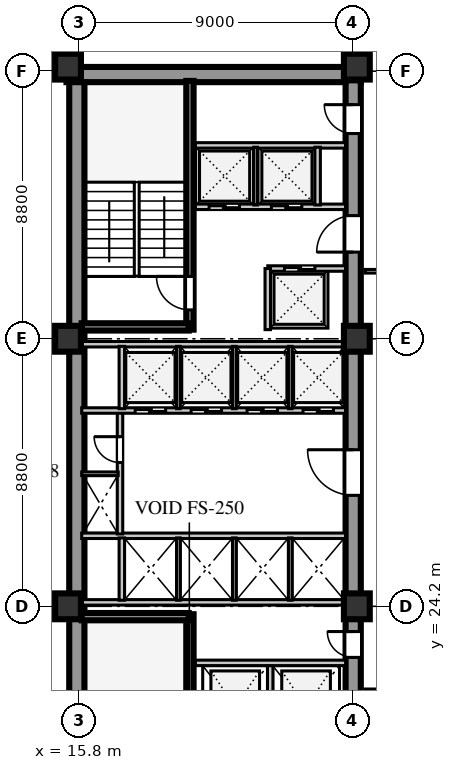
"""IFC4 building model, lengths in metres.
Left out: names, types, materials, properties, quantities, classifications, styles, units other than length and angle.
Written with IfcOpenShell. Run it as: python <this file> out.ifc"""

import sys

from ifc_helpers import new_model, si_unit, direction, frame, frame_2d, origin, origin_2d, place, context, subcontext, project, spatial, rectangle, extrude, element, fill, save


model = new_model("IFC4")
c1 = context("Model", 3, precision=1e-05, world=origin(), true_north=direction((0.0, 1.0)))
c2 = subcontext(c1, "Body", "Model", "MODEL_VIEW")
j1 = project(units=[si_unit("LENGTHUNIT", "METRE"), si_unit("PLANEANGLEUNIT", "RADIAN")], contexts=[c1])
p1 = place(None, origin())
s1 = spatial("IfcSite", under=j1, at=p1, CompositionType="ELEMENT")
p2 = place(p1, origin())
s2 = spatial("IfcBuilding", under=s1, at=p2, CompositionType="ELEMENT")
p3 = place(p2, frame((0.0, 0.0, 104.0)))
s3 = spatial("IfcBuildingStorey", under=s2, at=p3, CompositionType="ELEMENT", Elevation=104.0)
p4 = place(p3, frame((15.4, 41.69, 0.0), z_axis=(0.0, 0.0, 1.0), x_axis=(1.0, 0.0, 0.0)))
e1 = element("IfcWall", 1, at=p4, inside=s3, PredefinedType="SHEAR", context=c2, shape_type="SweptSolid", body=[
    extrude(rectangle(XDim=9.68, YDim=0.5, at=frame_2d((4.84, 0.0))), origin(), (0.0, 0.0, 1.0), 3.6),
])
p5 = place(p3, frame((15.74, 15.81, 0.0), z_axis=(0.0, 0.0, 1.0), x_axis=(0.0, 1.0, 0.0)))
e2 = element("IfcWall", 2, at=p5, inside=s3, PredefinedType="SHEAR", context=c2, shape_type="SweptSolid", body=[
    extrude(rectangle(XDim=25.63, YDim=0.5, at=frame_2d((12.815, 0.0))), origin(), (0.0, 0.0, 1.0), 3.6),
])
p6 = place(p3, frame((24.83, 15.74, 0.0), z_axis=(0.0, 0.0, 1.0), x_axis=(0.0, 1.0, 0.0)))
e3 = element("IfcWall", 3, at=p6, inside=s3, PredefinedType="SHEAR", context=c2, shape_type="SweptSolid", body=[
    extrude(rectangle(XDim=25.76, YDim=0.5, at=frame_2d((12.88, 0.0))), origin(), (0.0, 0.0, 1.0), 3.6),
])
p7 = place(p6, frame((1.61, 0.0, 0.0)))
e4 = element("IfcOpeningElement", 4, at=p7, cuts=e3, PredefinedType="OPENING", context=c2, shape_type="SweptSolid", body=[
    extrude(rectangle(XDim=1.2, YDim=2.1, at=frame_2d((0.6, 1.05))), frame((0.0, 0.26, 0.0), z_axis=(0.0, -1.0, 0.0), x_axis=(1.0, 0.0, 0.0)), (0.0, 0.0, 1.0), 0.52),
])
p8 = place(p6, frame((6.78, 0.0, 0.0)))
e5 = element("IfcOpeningElement", 5, at=p8, cuts=e3, PredefinedType="OPENING", context=c2, shape_type="SweptSolid", body=[
    extrude(rectangle(XDim=0.85, YDim=2.06, at=frame_2d((0.425, 1.03))), frame((0.0, 0.26, 0.0), z_axis=(0.0, -1.0, 0.0), x_axis=(1.0, 0.0, 0.0)), (0.0, 0.0, 1.0), 0.52),
])
p9 = place(p6, frame((12.11, 0.0, 0.0)))
e6 = element("IfcOpeningElement", 6, at=p9, cuts=e3, PredefinedType="OPENING", context=c2, shape_type="SweptSolid", body=[
    extrude(rectangle(XDim=1.5, YDim=2.12, at=frame_2d((0.75, 1.06))), frame((0.0, 0.26, 0.0), z_axis=(0.0, -1.0, 0.0), x_axis=(1.0, 0.0, 0.0)), (0.0, 0.0, 1.0), 0.52),
])
p10 = place(p6, frame((20.11, 0.0, 0.0)))
e7 = element("IfcOpeningElement", 7, at=p10, cuts=e3, PredefinedType="OPENING", context=c2, shape_type="SweptSolid", body=[
    extrude(rectangle(XDim=1.2, YDim=2.12, at=frame_2d((0.6, 1.06))), frame((0.0, 0.26, 0.0), z_axis=(0.0, -1.0, 0.0), x_axis=(1.0, 0.0, 0.0)), (0.0, 0.0, 1.0), 0.52),
])
p11 = place(p6, frame((24.01, 0.0, 0.0)))
e8 = element("IfcOpeningElement", 8, at=p11, cuts=e3, PredefinedType="OPENING", context=c2, shape_type="SweptSolid", body=[
    extrude(rectangle(XDim=0.95, YDim=2.1, at=frame_2d((0.475, 1.05))), frame((0.0, 0.26, 0.0), z_axis=(0.0, -1.0, 0.0), x_axis=(1.0, 0.0, 0.0)), (0.0, 0.0, 1.0), 0.52),
])
for number, where, z_axis, x_axis in (
    (9, (15.45, 24.2, 0.0), (0.0, 0.0, 1.0), (1.0, 0.0, 0.0)),
    (10, (15.45, 33.0, 0.0), (0.0, 0.0, 1.0), (1.0, 0.0, 0.0)),
    (11, (15.45, 41.95, 0.0), (0.0, 0.0, 1.0), (1.0, 0.0, 0.0)),
    (12, (24.95, 24.2, 0.0), (0.0, 0.0, 1.0), (1.0, 0.0, 0.0)),
    (13, (24.95, 33.0, 0.0), (0.0, 0.0, 1.0), (1.0, 0.0, 0.0)),
    (14, (24.95, 41.95, 0.0), (0.0, 0.0, 1.0), (1.0, 0.0, 0.0)),
):
    element("IfcColumn", number, at=place(p3, frame(where, z_axis=z_axis, x_axis=x_axis)), inside=s3, PredefinedType="COLUMN", context=c2, shape_type="SweptSolid", body=[
        extrude(rectangle(XDim=0.85, YDim=0.85, at=origin_2d()), origin(), (0.0, 0.0, 1.0), 3.6),
    ])
p12 = place(p3, frame((19.46, 15.74, 0.0), z_axis=(0.0, 0.0, 1.0), x_axis=(0.0, 1.0, 0.0)))
e15 = element("IfcWall", 15, at=p12, inside=s3, PredefinedType="SHEAR", context=c2, shape_type="SweptSolid", body=[
    extrude(rectangle(XDim=8.2, YDim=0.24, at=frame_2d((4.1, 0.0))), origin(), (0.0, 0.0, 1.0), 3.85),
])
p13 = place(p12, frame((0.45, 0.0, 0.0)))
e16 = element("IfcOpeningElement", 16, at=p13, cuts=e15, PredefinedType="OPENING", context=c2, shape_type="SweptSolid", body=[
    extrude(rectangle(XDim=1.1, YDim=2.1, at=frame_2d((0.55, 1.05))), frame((0.0, 0.13, 0.0), z_axis=(0.0, -1.0, 0.0), x_axis=(1.0, 0.0, 0.0)), (0.0, 0.0, 1.0), 0.26),
])
p14 = place(p3, frame((15.9, 23.86, 0.0), z_axis=(0.0, 0.0, 1.0), x_axis=(1.0, 0.0, 0.0)))
e17 = element("IfcWall", 17, at=p14, inside=s3, PredefinedType="SHEAR", context=c2, shape_type="SweptSolid", body=[
    extrude(rectangle(XDim=3.52, YDim=0.24, at=frame_2d((1.76, 0.0))), origin(), (0.0, 0.0, 1.0), 3.85),
])
p15 = place(p3, frame((22.1, 19.51, 0.0), z_axis=(0.0, 0.0, 1.0), x_axis=(0.0, 1.0, 0.0)))
e18 = element("IfcWall", 18, at=p15, inside=s3, PredefinedType="SOLIDWALL", context=c2, shape_type="SweptSolid", body=[
    extrude(rectangle(XDim=2.74, YDim=0.18, at=frame_2d((1.37, 0.0))), origin(), (0.0, 0.0, 1.0), 3.6),
])
p16 = place(p3, frame((19.64, 22.34, 0.0), z_axis=(0.0, 0.0, 1.0), x_axis=(1.0, 0.0, 0.0)))
e19 = element("IfcWall", 19, at=p16, inside=s3, PredefinedType="SOLIDWALL", context=c2, shape_type="SweptSolid", body=[
    extrude(rectangle(XDim=4.94, YDim=0.18, at=frame_2d((2.47, 0.0))), origin(), (0.0, 0.0, 1.0), 3.6),
])
p17 = place(p3, frame((15.9, 26.52, 0.0), z_axis=(0.0, 0.0, 1.0), x_axis=(1.0, 0.0, 0.0)))
e20 = element("IfcWall", 20, at=p17, inside=s3, PredefinedType="SOLIDWALL", context=c2, shape_type="SweptSolid", body=[
    extrude(rectangle(XDim=8.68, YDim=0.18, at=frame_2d((4.34, 0.0))), origin(), (0.0, 0.0, 1.0), 3.6),
])
p18 = place(p3, frame((15.9, 24.33, 0.0), z_axis=(0.0, 0.0, 1.0), x_axis=(1.0, 0.0, 0.0)))
e21 = element("IfcWall", 21, at=p18, inside=s3, PredefinedType="SOLIDWALL", context=c2, shape_type="SweptSolid", body=[
    extrude(rectangle(XDim=8.68, YDim=0.18, at=frame_2d((4.34, 0.0))), origin(), (0.0, 0.0, 1.0), 2.95),
])
p19 = place(p3, frame((17.22, 24.4, 0.0), z_axis=(0.0, 0.0, 1.0), x_axis=(0.0, 1.0, 0.0)))
e22 = element("IfcWall", 22, at=p19, inside=s3, PredefinedType="SOLIDWALL", context=c2, shape_type="SweptSolid", body=[
    extrude(rectangle(XDim=2.05, YDim=0.18, at=frame_2d((1.025, 0.0))), origin(), (0.0, 0.0, 1.0), 3.6),
])
for number, where, z_axis, x_axis in (
    (23, (19.08, 24.4, 0.0), (0.0, 0.0, 1.0), (0.0, 1.0, 0.0)),
    (24, (20.92, 24.4, 0.0), (0.0, 0.0, 1.0), (0.0, 1.0, 0.0)),
    (25, (22.76, 24.4, 0.0), (0.0, 0.0, 1.0), (0.0, 1.0, 0.0)),
):
    element("IfcWall", number, at=place(p3, frame(where, z_axis=z_axis, x_axis=x_axis)), inside=s3, PredefinedType="PARTITIONING", context=c2, shape_type="SweptSolid", body=[
        extrude(rectangle(XDim=2.05, YDim=0.12, at=frame_2d((1.025, 0.0))), origin(), (0.0, 0.0, 1.0), 3.6),
    ])
p20 = place(p3, frame((17.16, 26.58, 0.0), z_axis=(0.0, 0.0, 1.0), x_axis=(0.0, 1.0, 0.0)))
e26 = element("IfcWall", 26, at=p20, inside=s3, PredefinedType="SOLIDWALL", context=c2, shape_type="SweptSolid", body=[
    extrude(rectangle(XDim=4.02, YDim=0.18, at=frame_2d((2.01, 0.0))), origin(), (0.0, 0.0, 1.0), 3.6),
])
p21 = place(p20, frame((2.35, 0.0, 0.0)))
e27 = element("IfcOpeningElement", 27, at=p21, cuts=e26, PredefinedType="OPENING", context=c2, shape_type="SweptSolid", body=[
    extrude(rectangle(XDim=0.85, YDim=2.06, at=frame_2d((0.425, 1.03))), frame((0.0, 0.1, 0.0), z_axis=(0.0, -1.0, 0.0), x_axis=(1.0, 0.0, 0.0)), (0.0, 0.0, 1.0), 0.2),
])
p22 = place(p3, frame((15.9, 28.56, 0.0), z_axis=(0.0, 0.0, 1.0), x_axis=(1.0, 0.0, 0.0)))
e28 = element("IfcWall", 28, at=p22, inside=s3, PredefinedType="PARTITIONING", context=c2, shape_type="SweptSolid", body=[
    extrude(rectangle(XDim=1.2, YDim=0.12, at=frame_2d((0.6, 0.0))), origin(), (0.0, 0.0, 1.0), 3.6),
])
p23 = place(p3, frame((15.9, 30.64, 0.0), z_axis=(0.0, 0.0, 1.0), x_axis=(1.0, 0.0, 0.0)))
e29 = element("IfcWall", 29, at=p23, inside=s3, PredefinedType="SOLIDWALL", context=c2, shape_type="SweptSolid", body=[
    extrude(rectangle(XDim=8.68, YDim=0.18, at=frame_2d((4.34, 0.0))), origin(), (0.0, 0.0, 1.0), 3.6),
])
p24 = place(p23, frame((1.76, 0.0, 0.0)))
e30 = element("IfcOpeningElement", 30, at=p24, cuts=e29, PredefinedType="OPENING", context=c2, shape_type="SweptSolid", body=[
    extrude(rectangle(XDim=1.0, YDim=2.1, at=frame_2d((0.5, 1.05))), frame((0.0, 0.1, 0.0), z_axis=(0.0, -1.0, 0.0), x_axis=(1.0, 0.0, 0.0)), (0.0, 0.0, 1.0), 0.2),
])
p25 = place(p23, frame((3.6, 0.0, 0.0)))
e31 = element("IfcOpeningElement", 31, at=p25, cuts=e29, PredefinedType="OPENING", context=c2, shape_type="SweptSolid", body=[
    extrude(rectangle(XDim=1.0, YDim=2.1, at=frame_2d((0.5, 1.05))), frame((0.0, 0.1, 0.0), z_axis=(0.0, -1.0, 0.0), x_axis=(1.0, 0.0, 0.0)), (0.0, 0.0, 1.0), 0.2),
])
p26 = place(p23, frame((5.44, 0.0, 0.0)))
e32 = element("IfcOpeningElement", 32, at=p26, cuts=e29, PredefinedType="OPENING", context=c2, shape_type="SweptSolid", body=[
    extrude(rectangle(XDim=1.0, YDim=2.1, at=frame_2d((0.5, 1.05))), frame((0.0, 0.1, 0.0), z_axis=(0.0, -1.0, 0.0), x_axis=(1.0, 0.0, 0.0)), (0.0, 0.0, 1.0), 0.2),
])
p27 = place(p23, frame((7.28, 0.0, 0.0)))
e33 = element("IfcOpeningElement", 33, at=p27, cuts=e29, PredefinedType="OPENING", context=c2, shape_type="SweptSolid", body=[
    extrude(rectangle(XDim=1.0, YDim=2.1, at=frame_2d((0.5, 1.05))), frame((0.0, 0.1, 0.0), z_axis=(0.0, -1.0, 0.0), x_axis=(1.0, 0.0, 0.0)), (0.0, 0.0, 1.0), 0.2),
])
p28 = place(p3, frame((15.9, 32.82, 0.0), z_axis=(0.0, 0.0, 1.0), x_axis=(1.0, 0.0, 0.0)))
e34 = element("IfcWall", 34, at=p28, inside=s3, PredefinedType="SOLIDWALL", context=c2, shape_type="SweptSolid", body=[
    extrude(rectangle(XDim=8.68, YDim=0.18, at=frame_2d((4.34, 0.0))), origin(), (0.0, 0.0, 1.0), 2.95),
])
p29 = place(p3, frame((17.22, 30.7, 0.0), z_axis=(0.0, 0.0, 1.0), x_axis=(0.0, 1.0, 0.0)))
e35 = element("IfcWall", 35, at=p29, inside=s3, PredefinedType="SOLIDWALL", context=c2, shape_type="SweptSolid", body=[
    extrude(rectangle(XDim=2.05, YDim=0.18, at=frame_2d((1.025, 0.0))), origin(), (0.0, 0.0, 1.0), 3.6),
])
for number, where, z_axis, x_axis in (
    (36, (19.08, 30.7, 0.0), (0.0, 0.0, 1.0), (0.0, 1.0, 0.0)),
    (37, (20.92, 30.7, 0.0), (0.0, 0.0, 1.0), (0.0, 1.0, 0.0)),
    (38, (22.76, 30.7, 0.0), (0.0, 0.0, 1.0), (0.0, 1.0, 0.0)),
):
    element("IfcWall", number, at=place(p3, frame(where, z_axis=z_axis, x_axis=x_axis)), inside=s3, PredefinedType="PARTITIONING", context=c2, shape_type="SweptSolid", body=[
        extrude(rectangle(XDim=2.05, YDim=0.12, at=frame_2d((1.025, 0.0))), origin(), (0.0, 0.0, 1.0), 3.6),
    ])
p30 = place(p3, frame((19.46, 33.3, 0.0), z_axis=(0.0, 0.0, 1.0), x_axis=(0.0, 1.0, 0.0)))
e39 = element("IfcWall", 39, at=p30, inside=s3, PredefinedType="SHEAR", context=c2, shape_type="SweptSolid", body=[
    extrude(rectangle(XDim=8.18, YDim=0.24, at=frame_2d((4.09, 0.0))), origin(), (0.0, 0.0, 1.0), 3.85),
])
p31 = place(p30, frame((0.65, 0.0, 0.0)))
e40 = element("IfcOpeningElement", 40, at=p31, cuts=e39, PredefinedType="OPENING", context=c2, shape_type="SweptSolid", body=[
    extrude(rectangle(XDim=1.1, YDim=2.1, at=frame_2d((0.55, 1.05))), frame((0.0, 0.13, 0.0), z_axis=(0.0, -1.0, 0.0), x_axis=(1.0, 0.0, 0.0)), (0.0, 0.0, 1.0), 0.26),
])
p32 = place(p3, frame((15.9, 33.39, 0.0), z_axis=(0.0, 0.0, 1.0), x_axis=(1.0, 0.0, 0.0)))
e41 = element("IfcWall", 41, at=p32, inside=s3, PredefinedType="SHEAR", context=c2, shape_type="SweptSolid", body=[
    extrude(rectangle(XDim=3.52, YDim=0.24, at=frame_2d((1.76, 0.0))), origin(), (0.0, 0.0, 1.0), 3.85),
])
p33 = place(p3, frame((22.02, 35.31, 0.0), z_axis=(0.0, 0.0, 1.0), x_axis=(1.0, 0.0, 0.0)))
e42 = element("IfcWall", 42, at=p33, inside=s3, PredefinedType="SOLIDWALL", context=c2, shape_type="SweptSolid", body=[
    extrude(rectangle(XDim=2.56, YDim=0.18, at=frame_2d((1.28, 0.0))), origin(), (0.0, 0.0, 1.0), 3.6),
])
p34 = place(p33, frame((0.55, 0.0, 0.0)))
e43 = element("IfcOpeningElement", 43, at=p34, cuts=e42, PredefinedType="OPENING", context=c2, shape_type="SweptSolid", body=[
    extrude(rectangle(XDim=1.0, YDim=2.1, at=frame_2d((0.5, 1.05))), frame((0.0, 0.1, 0.0), z_axis=(0.0, -1.0, 0.0), x_axis=(1.0, 0.0, 0.0)), (0.0, 0.0, 1.0), 0.2),
])
p35 = place(p3, frame((22.02, 33.3, 0.0), z_axis=(0.0, 0.0, 1.0), x_axis=(0.0, 1.0, 0.0)))
e44 = element("IfcWall", 44, at=p35, inside=s3, PredefinedType="SOLIDWALL", context=c2, shape_type="SweptSolid", body=[
    extrude(rectangle(XDim=2.01, YDim=0.18, at=frame_2d((1.005, 0.0))), origin(), (0.0, 0.0, 1.0), 3.6),
])
p36 = place(p3, frame((19.64, 37.34, 0.0), z_axis=(0.0, 0.0, 1.0), x_axis=(1.0, 0.0, 0.0)))
e45 = element("IfcWall", 45, at=p36, inside=s3, PredefinedType="SOLIDWALL", context=c2, shape_type="SweptSolid", body=[
    extrude(rectangle(XDim=4.94, YDim=0.18, at=frame_2d((2.47, 0.0))), origin(), (0.0, 0.0, 1.0), 3.6),
])
p37 = place(p36, frame((0.45, 0.0, 0.0)))
e46 = element("IfcOpeningElement", 46, at=p37, cuts=e45, PredefinedType="OPENING", context=c2, shape_type="SweptSolid", body=[
    extrude(rectangle(XDim=1.0, YDim=2.1, at=frame_2d((0.5, 1.05))), frame((0.0, 0.1, 0.0), z_axis=(0.0, -1.0, 0.0), x_axis=(1.0, 0.0, 0.0)), (0.0, 0.0, 1.0), 0.2),
])
p38 = place(p36, frame((2.5, 0.0, 0.0)))
e47 = element("IfcOpeningElement", 47, at=p38, cuts=e45, PredefinedType="OPENING", context=c2, shape_type="SweptSolid", body=[
    extrude(rectangle(XDim=1.0, YDim=2.1, at=frame_2d((0.5, 1.05))), frame((0.0, 0.1, 0.0), z_axis=(0.0, -1.0, 0.0), x_axis=(1.0, 0.0, 0.0)), (0.0, 0.0, 1.0), 0.2),
])
p39 = place(p3, frame((19.64, 39.36, 0.0), z_axis=(0.0, 0.0, 1.0), x_axis=(1.0, 0.0, 0.0)))
e48 = element("IfcWall", 48, at=p39, inside=s3, PredefinedType="SOLIDWALL", context=c2, shape_type="SweptSolid", body=[
    extrude(rectangle(XDim=4.94, YDim=0.18, at=frame_2d((2.47, 0.0))), origin(), (0.0, 0.0, 1.0), 3.6),
])
p40 = place(p3, frame((21.62, 37.4, 0.0), z_axis=(0.0, 0.0, 1.0), x_axis=(0.0, 1.0, 0.0)))
e49 = element("IfcWall", 49, at=p40, inside=s3, PredefinedType="PARTITIONING", context=c2, shape_type="SweptSolid", body=[
    extrude(rectangle(XDim=1.9, YDim=0.12, at=frame_2d((0.95, 0.0))), origin(), (0.0, 0.0, 1.0), 3.6),
])
p41 = place(p3, frame((23.66, 37.4, 0.0), z_axis=(0.0, 0.0, 1.0), x_axis=(0.0, 1.0, 0.0)))
e50 = element("IfcWall", 50, at=p41, inside=s3, PredefinedType="SOLIDWALL", context=c2, shape_type="SweptSolid", body=[
    extrude(rectangle(XDim=1.9, YDim=0.18, at=frame_2d((0.95, 0.0))), origin(), (0.0, 0.0, 1.0), 3.6),
])
p42 = place(p3, frame((25.22, 21.42, 0.0), z_axis=(0.0, 0.0, 1.0), x_axis=(1.0, 0.0, 0.0)))
e51 = element("IfcWall", 51, at=p42, inside=s3, PredefinedType="PARTITIONING", context=c2, shape_type="SweptSolid", body=[
    extrude(rectangle(XDim=15.6, YDim=0.12, at=frame_2d((7.8, 0.0))), origin(), (0.0, 0.0, 1.0), 3.2),
])
p43 = place(p42, frame((0.73, 0.0, 0.0)))
e52 = element("IfcOpeningElement", 52, at=p43, cuts=e51, PredefinedType="OPENING", context=c2, shape_type="SweptSolid", body=[
    extrude(rectangle(XDim=0.95, YDim=2.1, at=frame_2d((0.475, 1.05))), frame((0.0, 0.07, 0.0), z_axis=(0.0, -1.0, 0.0), x_axis=(1.0, 0.0, 0.0)), (0.0, 0.0, 1.0), 0.14),
])
p44 = place(p3, frame((25.22, 35.22, 0.0), z_axis=(0.0, 0.0, 1.0), x_axis=(1.0, 0.0, 0.0)))
e53 = element("IfcWall", 53, at=p44, inside=s3, PredefinedType="PARTITIONING", context=c2, shape_type="SweptSolid", body=[
    extrude(rectangle(XDim=9.5, YDim=0.12, at=frame_2d((4.75, 0.0))), origin(), (0.0, 0.0, 1.0), 3.6),
])
p45 = place(p44, frame((0.65, 0.0, 0.0)))
e54 = element("IfcOpeningElement", 54, at=p45, cuts=e53, PredefinedType="OPENING", context=c2, shape_type="SweptSolid", body=[
    extrude(rectangle(XDim=0.95, YDim=2.1, at=frame_2d((0.475, 1.05))), frame((0.0, 0.07, 0.0), z_axis=(0.0, -1.0, 0.0), x_axis=(1.0, 0.0, 0.0)), (0.0, 0.0, 1.0), 0.14),
])
p46 = place(p44, frame((5.4, 0.0, 0.0)))
e55 = element("IfcOpeningElement", 55, at=p46, cuts=e53, PredefinedType="OPENING", context=c2, shape_type="SweptSolid", body=[
    extrude(rectangle(XDim=1.05, YDim=2.1, at=frame_2d((0.525, 1.05))), frame((0.0, 0.07, 0.0), z_axis=(0.0, -1.0, 0.0), x_axis=(1.0, 0.0, 0.0)), (0.0, 0.0, 1.0), 0.14),
])
p47 = place(p8, frame((0.85, 0.0, 0.0), z_axis=(0.0, 0.0, 1.0), x_axis=(-1.0, 0.0, 0.0)))
e56 = element("IfcDoor", 56, at=p47, inside=s3, OperationType="SINGLE_SWING_LEFT", PredefinedType="DOOR", context=c2, shape_type="SweptSolid", body=[
    extrude(rectangle(XDim=0.85, YDim=2.06, at=frame_2d((0.425, 1.03))), frame((0.0, 0.025, 0.0), z_axis=(0.0, -1.0, 0.0), x_axis=(1.0, 0.0, 0.0)), (0.0, 0.0, 1.0), 0.05),
])
fill(e5, e56)
p48 = place(p21, origin())
e57 = element("IfcDoor", 57, at=p48, inside=s3, OperationType="SINGLE_SWING_RIGHT", PredefinedType="DOOR", context=c2, shape_type="SweptSolid", body=[
    extrude(rectangle(XDim=0.85, YDim=2.06, at=frame_2d((0.425, 1.03))), frame((0.0, 0.025, 0.0), z_axis=(0.0, -1.0, 0.0), x_axis=(1.0, 0.0, 0.0)), (0.0, 0.0, 1.0), 0.05),
])
fill(e27, e57)
p49 = place(p9, frame((1.5, 0.0, 0.0), z_axis=(0.0, 0.0, 1.0), x_axis=(-1.0, 0.0, 0.0)))
e58 = element("IfcDoor", 58, at=p49, inside=s3, OperationType="SINGLE_SWING_LEFT", PredefinedType="DOOR", context=c2, shape_type="SweptSolid", body=[
    extrude(rectangle(XDim=1.5, YDim=2.12, at=frame_2d((0.75, 1.06))), frame((0.0, 0.025, 0.0), z_axis=(0.0, -1.0, 0.0), x_axis=(1.0, 0.0, 0.0)), (0.0, 0.0, 1.0), 0.05),
])
fill(e6, e58)
p50 = place(p24, frame((1.0, 0.0, 0.0), z_axis=(0.0, 0.0, 1.0), x_axis=(-1.0, 0.0, 0.0)))
e59 = element("IfcDoor", 59, at=p50, inside=s3, OperationType="DOUBLE_DOOR_SLIDING", PredefinedType="DOOR", context=c2, shape_type="SweptSolid", body=[
    extrude(rectangle(XDim=1.0, YDim=2.1, at=frame_2d((0.5, 1.05))), frame((0.0, 0.025, 0.0), z_axis=(0.0, -1.0, 0.0), x_axis=(1.0, 0.0, 0.0)), (0.0, 0.0, 1.0), 0.05),
])
fill(e30, e59)
p51 = place(p25, frame((1.0, 0.0, 0.0), z_axis=(0.0, 0.0, 1.0), x_axis=(-1.0, 0.0, 0.0)))
e60 = element("IfcDoor", 60, at=p51, inside=s3, OperationType="DOUBLE_DOOR_SLIDING", PredefinedType="DOOR", context=c2, shape_type="SweptSolid", body=[
    extrude(rectangle(XDim=1.0, YDim=2.1, at=frame_2d((0.5, 1.05))), frame((0.0, 0.025, 0.0), z_axis=(0.0, -1.0, 0.0), x_axis=(1.0, 0.0, 0.0)), (0.0, 0.0, 1.0), 0.05),
])
fill(e31, e60)
p52 = place(p26, frame((1.0, 0.0, 0.0), z_axis=(0.0, 0.0, 1.0), x_axis=(-1.0, 0.0, 0.0)))
e61 = element("IfcDoor", 61, at=p52, inside=s3, OperationType="DOUBLE_DOOR_SLIDING", PredefinedType="DOOR", context=c2, shape_type="SweptSolid", body=[
    extrude(rectangle(XDim=1.0, YDim=2.1, at=frame_2d((0.5, 1.05))), frame((0.0, 0.025, 0.0), z_axis=(0.0, -1.0, 0.0), x_axis=(1.0, 0.0, 0.0)), (0.0, 0.0, 1.0), 0.05),
])
fill(e32, e61)
p53 = place(p27, frame((1.0, 0.0, 0.0), z_axis=(0.0, 0.0, 1.0), x_axis=(-1.0, 0.0, 0.0)))
e62 = element("IfcDoor", 62, at=p53, inside=s3, OperationType="DOUBLE_DOOR_SLIDING", PredefinedType="DOOR", context=c2, shape_type="SweptSolid", body=[
    extrude(rectangle(XDim=1.0, YDim=2.1, at=frame_2d((0.5, 1.05))), frame((0.0, 0.025, 0.0), z_axis=(0.0, -1.0, 0.0), x_axis=(1.0, 0.0, 0.0)), (0.0, 0.0, 1.0), 0.05),
])
fill(e33, e62)
p54 = place(p31, origin())
e63 = element("IfcDoor", 63, at=p54, inside=s3, OperationType="SINGLE_SWING_RIGHT", PredefinedType="DOOR", context=c2, shape_type="SweptSolid", body=[
    extrude(rectangle(XDim=1.1, YDim=2.1, at=frame_2d((0.55, 1.05))), frame((0.0, 0.025, 0.0), z_axis=(0.0, -1.0, 0.0), x_axis=(1.0, 0.0, 0.0)), (0.0, 0.0, 1.0), 0.05),
])
fill(e40, e63)
p55 = place(p10, frame((1.2, 0.0, 0.0), z_axis=(0.0, 0.0, 1.0), x_axis=(-1.0, 0.0, 0.0)))
e64 = element("IfcDoor", 64, at=p55, inside=s3, OperationType="SINGLE_SWING_RIGHT", PredefinedType="DOOR", context=c2, shape_type="SweptSolid", body=[
    extrude(rectangle(XDim=1.2, YDim=2.12, at=frame_2d((0.6, 1.06))), frame((0.0, 0.025, 0.0), z_axis=(0.0, -1.0, 0.0), x_axis=(1.0, 0.0, 0.0)), (0.0, 0.0, 1.0), 0.05),
])
fill(e7, e64)
p56 = place(p37, frame((1.0, 0.0, 0.0), z_axis=(0.0, 0.0, 1.0), x_axis=(-1.0, 0.0, 0.0)))
e65 = element("IfcDoor", 65, at=p56, inside=s3, OperationType="DOUBLE_DOOR_SLIDING", PredefinedType="DOOR", context=c2, shape_type="SweptSolid", body=[
    extrude(rectangle(XDim=1.0, YDim=2.1, at=frame_2d((0.5, 1.05))), frame((0.0, 0.025, 0.0), z_axis=(0.0, -1.0, 0.0), x_axis=(1.0, 0.0, 0.0)), (0.0, 0.0, 1.0), 0.05),
])
fill(e46, e65)
p57 = place(p38, frame((1.0, 0.0, 0.0), z_axis=(0.0, 0.0, 1.0), x_axis=(-1.0, 0.0, 0.0)))
e66 = element("IfcDoor", 66, at=p57, inside=s3, OperationType="DOUBLE_DOOR_SLIDING", PredefinedType="DOOR", context=c2, shape_type="SweptSolid", body=[
    extrude(rectangle(XDim=1.0, YDim=2.1, at=frame_2d((0.5, 1.05))), frame((0.0, 0.025, 0.0), z_axis=(0.0, -1.0, 0.0), x_axis=(1.0, 0.0, 0.0)), (0.0, 0.0, 1.0), 0.05),
])
fill(e47, e66)
p58 = place(p34, origin())
e67 = element("IfcDoor", 67, at=p58, inside=s3, OperationType="DOUBLE_DOOR_SLIDING", PredefinedType="DOOR", context=c2, shape_type="SweptSolid", body=[
    extrude(rectangle(XDim=1.0, YDim=2.1, at=frame_2d((0.5, 1.05))), frame((0.0, 0.025, 0.0), z_axis=(0.0, -1.0, 0.0), x_axis=(1.0, 0.0, 0.0)), (0.0, 0.0, 1.0), 0.05),
])
fill(e43, e67)
p59 = place(p11, frame((0.95, 0.0, 0.0), z_axis=(0.0, 0.0, 1.0), x_axis=(-1.0, 0.0, 0.0)))
e68 = element("IfcDoor", 68, at=p59, inside=s3, OperationType="SINGLE_SWING_LEFT", PredefinedType="DOOR", context=c2, shape_type="SweptSolid", body=[
    extrude(rectangle(XDim=0.95, YDim=2.1, at=frame_2d((0.475, 1.05))), frame((0.0, 0.025, 0.0), z_axis=(0.0, -1.0, 0.0), x_axis=(1.0, 0.0, 0.0)), (0.0, 0.0, 1.0), 0.05),
])
fill(e8, e68)
save(model, sys.argv[1])
